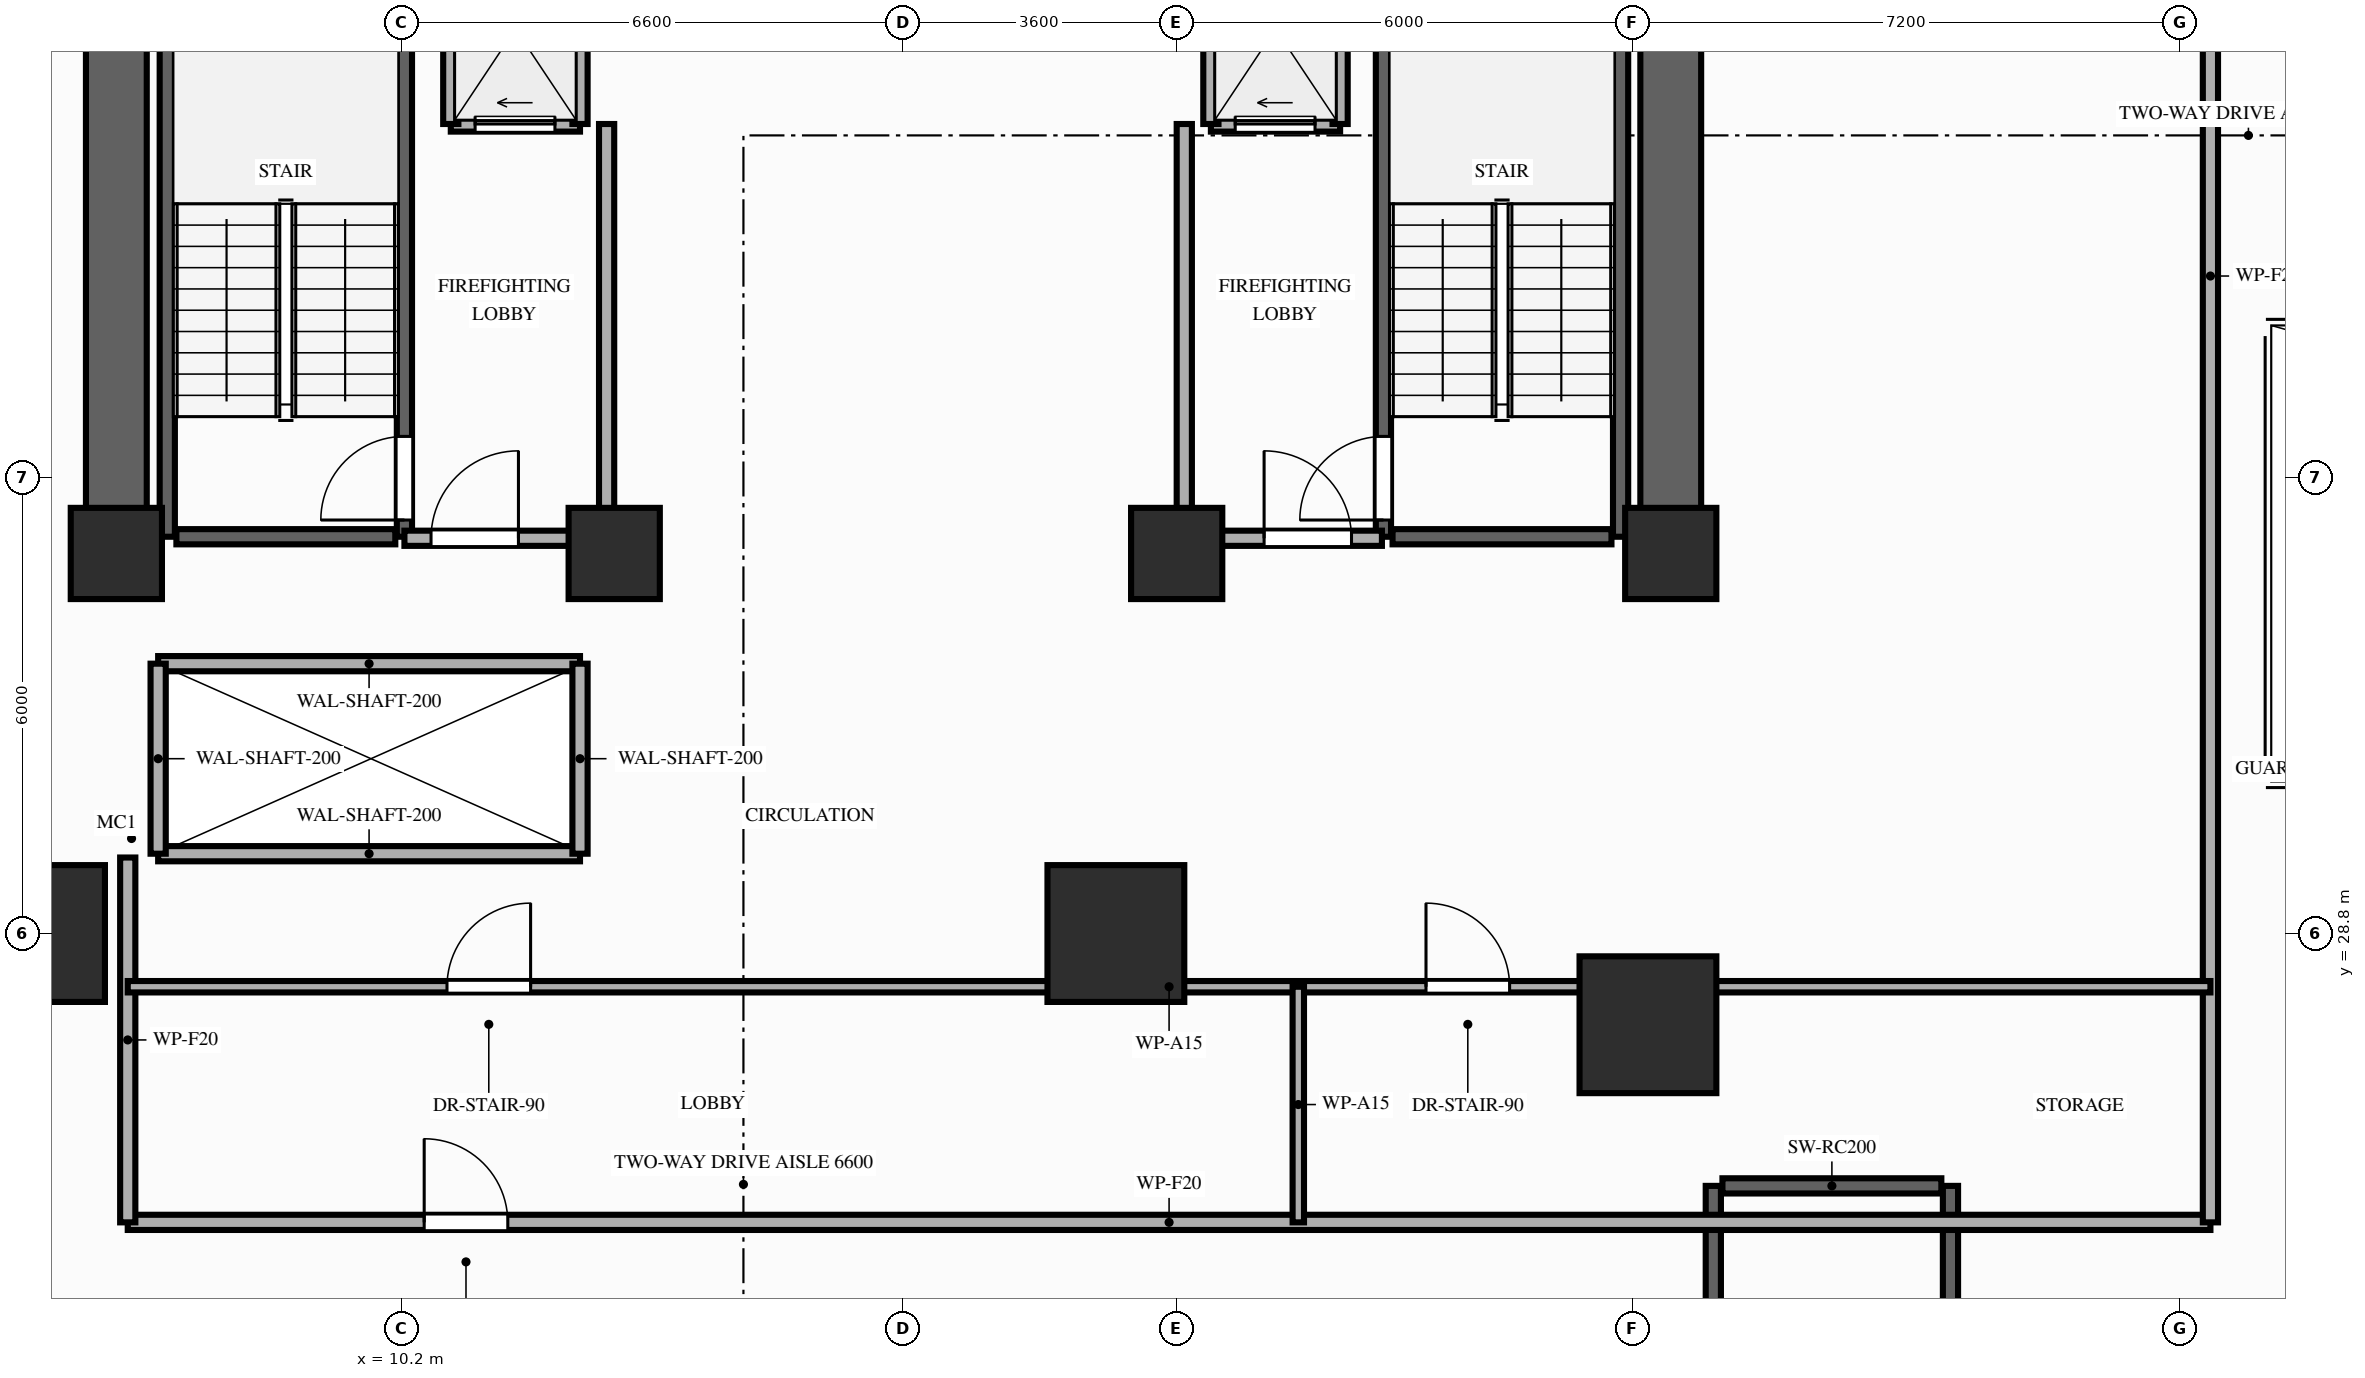
"""IFC4 building model, lengths in metres.
Left out: names, types, materials, properties, quantities, classifications, styles, units other than length and angle.
Written with IfcOpenShell. Run it as: python <this file> out.ifc"""

import sys

from ifc_helpers import new_model, si_unit, direction, frame, frame_2d, origin, origin_2d, place, context, subcontext, project, spatial, rectangle, extrude, element, fill, save


model = new_model("IFC4")
c1 = context("Model", 3, precision=1e-05, world=origin(), true_north=direction((0.0, 1.0)))
c2 = subcontext(c1, "Body", "Model", "MODEL_VIEW")
j1 = project(units=[si_unit("LENGTHUNIT", "METRE"), si_unit("PLANEANGLEUNIT", "RADIAN")], contexts=[c1])
p1 = place(None, origin())
s1 = spatial("IfcSite", under=j1, at=p1, CompositionType="ELEMENT")
p2 = place(p1, origin())
s2 = spatial("IfcBuilding", under=s1, at=p2, CompositionType="ELEMENT")
p3 = place(p2, frame((0.0, 0.0, -3.8)))
s3 = spatial("IfcBuildingStorey", under=s2, at=p3, CompositionType="ELEMENT", Elevation=-3.8)
for number, where, z_axis, x_axis in (
    (1, (6.45, 33.8, 0.0), (0.0, 0.0, 1.0), (1.0, 0.0, 0.0)),
    (2, (13.0, 33.8, 0.0), (0.0, 0.0, 1.0), (1.0, 0.0, 0.0)),
    (3, (20.4, 33.8, 0.0), (0.0, 0.0, 1.0), (1.0, 0.0, 0.0)),
    (4, (26.9, 33.8, 0.0), (0.0, 0.0, 1.0), (1.0, 0.0, 0.0)),
):
    element("IfcColumn", number, at=place(p3, frame(where, z_axis=z_axis, x_axis=x_axis)), inside=s3, PredefinedType="COLUMN", context=c2, shape_type="SweptSolid", body=[
        extrude(rectangle(XDim=1.2, YDim=1.2, at=origin_2d()), origin(), (0.0, 0.0, 1.0), 3.8),
    ])
for number, where, z_axis, x_axis in (
    (5, (5.4, 28.8, 0.0), (0.0, 0.0, 1.0), (1.0, 0.0, 0.0)),
    (6, (19.6, 28.8, 0.0), (0.0, 0.0, 1.0), (1.0, 0.0, 0.0)),
    (7, (26.6, 27.6, 0.0), (0.0, 0.0, 1.0), (1.0, 0.0, 0.0)),
):
    element("IfcColumn", number, at=place(p3, frame(where, z_axis=z_axis, x_axis=x_axis)), inside=s3, PredefinedType="COLUMN", context=c2, shape_type="SweptSolid", body=[
        extrude(rectangle(XDim=1.8, YDim=1.8, at=origin_2d()), origin(), (0.0, 0.0, 1.0), 3.8),
    ])
for number, where, z_axis, x_axis in (
    (8, (6.45, 33.8, 0.0), (0.0, 0.0, 1.0), (0.0, 1.0, 0.0)),
    (9, (26.9, 33.8, 0.0), (0.0, 0.0, 1.0), (0.0, 1.0, 0.0)),
):
    element("IfcWall", number, at=place(p3, frame(where, z_axis=z_axis, x_axis=x_axis)), inside=s3, PredefinedType="SHEAR", context=c2, shape_type="SweptSolid", body=[
        extrude(rectangle(XDim=7.95, YDim=0.8, at=frame_2d((3.975, 0.0))), origin(), (0.0, 0.0, 1.0), 3.55),
    ])
p4 = place(p3, frame((7.12, 34.02, 0.0), z_axis=(0.0, 0.0, 1.0), x_axis=(0.0, 1.0, 0.0)))
e10 = element("IfcWall", 10, at=p4, inside=s3, PredefinedType="SHEAR", context=c2, shape_type="SweptSolid", body=[
    extrude(rectangle(XDim=7.78, YDim=0.2, at=frame_2d((3.89, 0.0))), origin(), (0.0, 0.0, 1.0), 3.55),
])
p5 = place(p3, frame((10.24, 34.02, 0.0), z_axis=(0.0, 0.0, 1.0), x_axis=(0.0, 1.0, 0.0)))
e11 = element("IfcWall", 11, at=p5, inside=s3, PredefinedType="SHEAR", context=c2, shape_type="SweptSolid", body=[
    extrude(rectangle(XDim=7.78, YDim=0.2, at=frame_2d((3.89, 0.0))), origin(), (0.0, 0.0, 1.0), 3.55),
])
p6 = place(p5, frame((0.22, 0.0, 0.0)))
e12 = element("IfcOpeningElement", 12, at=p6, cuts=e11, PredefinedType="OPENING", context=c2, shape_type="SweptSolid", body=[
    extrude(rectangle(XDim=1.1, YDim=2.15, at=frame_2d((0.55, 1.075))), frame((0.0, 0.11, 0.0), z_axis=(0.0, -1.0, 0.0), x_axis=(1.0, 0.0, 0.0)), (0.0, 0.0, 1.0), 0.22),
])
p7 = place(p3, frame((7.24, 34.02, 0.0), z_axis=(0.0, 0.0, 1.0), x_axis=(1.0, 0.0, 0.0)))
e13 = element("IfcWall", 13, at=p7, inside=s3, PredefinedType="SHEAR", context=c2, shape_type="SweptSolid", body=[
    extrude(rectangle(XDim=2.88, YDim=0.2, at=frame_2d((1.44, 0.0))), origin(), (0.0, 0.0, 1.0), 3.55),
])
p8 = place(p3, frame((23.12, 34.02, 0.0), z_axis=(0.0, 0.0, 1.0), x_axis=(0.0, 1.0, 0.0)))
e14 = element("IfcWall", 14, at=p8, inside=s3, PredefinedType="SHEAR", context=c2, shape_type="SweptSolid", body=[
    extrude(rectangle(XDim=7.78, YDim=0.2, at=frame_2d((3.89, 0.0))), origin(), (0.0, 0.0, 1.0), 3.55),
])
p9 = place(p8, frame((0.22, 0.0, 0.0)))
e15 = element("IfcOpeningElement", 15, at=p9, cuts=e14, PredefinedType="OPENING", context=c2, shape_type="SweptSolid", body=[
    extrude(rectangle(XDim=1.1, YDim=2.15, at=frame_2d((0.55, 1.075))), frame((0.0, 0.11, 0.0), z_axis=(0.0, -1.0, 0.0), x_axis=(1.0, 0.0, 0.0)), (0.0, 0.0, 1.0), 0.22),
])
p10 = place(p3, frame((26.24, 34.02, 0.0), z_axis=(0.0, 0.0, 1.0), x_axis=(0.0, 1.0, 0.0)))
e16 = element("IfcWall", 16, at=p10, inside=s3, PredefinedType="SHEAR", context=c2, shape_type="SweptSolid", body=[
    extrude(rectangle(XDim=7.78, YDim=0.2, at=frame_2d((3.89, 0.0))), origin(), (0.0, 0.0, 1.0), 3.55),
])
p11 = place(p3, frame((23.24, 34.02, 0.0), z_axis=(0.0, 0.0, 1.0), x_axis=(1.0, 0.0, 0.0)))
e17 = element("IfcWall", 17, at=p11, inside=s3, PredefinedType="SHEAR", context=c2, shape_type="SweptSolid", body=[
    extrude(rectangle(XDim=2.88, YDim=0.2, at=frame_2d((1.44, 0.0))), origin(), (0.0, 0.0, 1.0), 3.55),
])
for number, where, z_axis, x_axis in (
    (18, (27.46, 17.52, 0.0), (0.0, 0.0, 1.0), (0.0, 1.0, 0.0)),
    (19, (30.58, 17.52, 0.0), (0.0, 0.0, 1.0), (0.0, 1.0, 0.0)),
):
    element("IfcWall", number, at=place(p3, frame(where, z_axis=z_axis, x_axis=x_axis)), inside=s3, PredefinedType="SHEAR", context=c2, shape_type="SweptSolid", body=[
        extrude(rectangle(XDim=7.96, YDim=0.2, at=frame_2d((3.98, 0.0))), origin(), (0.0, 0.0, 1.0), 3.55),
    ])
p12 = place(p3, frame((27.58, 25.48, 0.0), z_axis=(0.0, 0.0, 1.0), x_axis=(1.0, 0.0, 0.0)))
e20 = element("IfcWall", 20, at=p12, inside=s3, PredefinedType="SHEAR", context=c2, shape_type="SweptSolid", body=[
    extrude(rectangle(XDim=2.88, YDim=0.2, at=frame_2d((1.44, 0.0))), origin(), (0.0, 0.0, 1.0), 3.55),
])
for number, where, z_axis, x_axis in (
    (21, (7.0, 29.85, 0.0), (0.0, 0.0, 1.0), (1.0, 0.0, 0.0)),
    (22, (7.0, 32.35, 0.0), (0.0, 0.0, 1.0), (1.0, 0.0, 0.0)),
):
    element("IfcWall", number, at=place(p3, frame(where, z_axis=z_axis, x_axis=x_axis)), inside=s3, PredefinedType="MOVABLE", context=c2, shape_type="SweptSolid", body=[
        extrude(rectangle(XDim=5.55, YDim=0.2, at=frame_2d((2.775, 0.0))), origin(), (0.0, 0.0, 1.0), 3.55),
    ])
for number, where, z_axis, x_axis in (
    (23, (7.0, 29.85, 0.0), (0.0, 0.0, 1.0), (0.0, 1.0, 0.0)),
    (24, (12.55, 29.85, 0.0), (0.0, 0.0, 1.0), (0.0, 1.0, 0.0)),
):
    element("IfcWall", number, at=place(p3, frame(where, z_axis=z_axis, x_axis=x_axis)), inside=s3, PredefinedType="MOVABLE", context=c2, shape_type="SweptSolid", body=[
        extrude(rectangle(XDim=2.5, YDim=0.2, at=frame_2d((1.25, 0.0))), origin(), (0.0, 0.0, 1.0), 3.55),
    ])
p13 = place(p3, frame((10.85, 39.45, 0.0), z_axis=(0.0, 0.0, 1.0), x_axis=(1.0, 0.0, 0.0)))
e25 = element("IfcWall", 25, at=p13, inside=s3, PredefinedType="MOVABLE", context=c2, shape_type="SweptSolid", body=[
    extrude(rectangle(XDim=1.7, YDim=0.2, at=frame_2d((0.85, 0.0))), origin(), (0.0, 0.0, 1.0), 3.55),
])
p14 = place(p13, frame((0.32, 0.0, 0.0)))
e26 = element("IfcOpeningElement", 26, at=p14, cuts=e25, PredefinedType="OPENING", context=c2, shape_type="SweptSolid", body=[
    extrude(rectangle(XDim=1.05, YDim=2.15, at=frame_2d((0.525, 1.075))), frame((0.0, 0.11, 0.0), z_axis=(0.0, -1.0, 0.0), x_axis=(1.0, 0.0, 0.0)), (0.0, 0.0, 1.0), 0.22),
])
p15 = place(p3, frame((20.85, 39.45, 0.0), z_axis=(0.0, 0.0, 1.0), x_axis=(1.0, 0.0, 0.0)))
e27 = element("IfcWall", 27, at=p15, inside=s3, PredefinedType="MOVABLE", context=c2, shape_type="SweptSolid", body=[
    extrude(rectangle(XDim=1.7, YDim=0.2, at=frame_2d((0.85, 0.0))), origin(), (0.0, 0.0, 1.0), 3.55),
])
p16 = place(p15, frame((0.32, 0.0, 0.0)))
e28 = element("IfcOpeningElement", 28, at=p16, cuts=e27, PredefinedType="OPENING", context=c2, shape_type="SweptSolid", body=[
    extrude(rectangle(XDim=1.05, YDim=2.15, at=frame_2d((0.525, 1.075))), frame((0.0, 0.11, 0.0), z_axis=(0.0, -1.0, 0.0), x_axis=(1.0, 0.0, 0.0)), (0.0, 0.0, 1.0), 0.22),
])
for number, where, z_axis, x_axis in (
    (29, (10.85, 39.45, 0.0), (0.0, 0.0, 1.0), (0.0, 1.0, 0.0)),
    (30, (12.55, 39.45, 0.0), (0.0, 0.0, 1.0), (0.0, 1.0, 0.0)),
):
    element("IfcWall", number, at=place(p3, frame(where, z_axis=z_axis, x_axis=x_axis)), inside=s3, PredefinedType="MOVABLE", context=c2, shape_type="SweptSolid", body=[
        extrude(rectangle(XDim=2.65, YDim=0.2, at=frame_2d((1.325, 0.0))), origin(), (0.0, 0.0, 1.0), 3.55),
    ])
p17 = place(p3, frame((12.9, 34.0, 0.0), z_axis=(0.0, 0.0, 1.0), x_axis=(0.0, 1.0, 0.0)))
e31 = element("IfcWall", 31, at=p17, inside=s3, PredefinedType="PARTITIONING", context=c2, shape_type="SweptSolid", body=[
    extrude(rectangle(XDim=5.45, YDim=0.2, at=frame_2d((2.725, 0.0))), origin(), (0.0, 0.0, 1.0), 2.74),
])
p18 = place(p3, frame((10.24, 34.0, 0.0), z_axis=(0.0, 0.0, 1.0), x_axis=(1.0, 0.0, 0.0)))
e32 = element("IfcWall", 32, at=p18, inside=s3, PredefinedType="PARTITIONING", context=c2, shape_type="SweptSolid", body=[
    extrude(rectangle(XDim=2.66, YDim=0.2, at=frame_2d((1.33, 0.0))), origin(), (0.0, 0.0, 1.0), 2.74),
])
p19 = place(p18, frame((0.35, 0.0, 0.0)))
e33 = element("IfcOpeningElement", 33, at=p19, cuts=e32, PredefinedType="OPENING", context=c2, shape_type="SweptSolid", body=[
    extrude(rectangle(XDim=1.15, YDim=2.15, at=frame_2d((0.575, 1.075))), frame((0.0, 0.11, 0.0), z_axis=(0.0, -1.0, 0.0), x_axis=(1.0, 0.0, 0.0)), (0.0, 0.0, 1.0), 0.22),
])
for number, where, z_axis, x_axis in (
    (34, (20.85, 39.45, 0.0), (0.0, 0.0, 1.0), (0.0, 1.0, 0.0)),
    (35, (22.55, 39.45, 0.0), (0.0, 0.0, 1.0), (0.0, 1.0, 0.0)),
):
    element("IfcWall", number, at=place(p3, frame(where, z_axis=z_axis, x_axis=x_axis)), inside=s3, PredefinedType="MOVABLE", context=c2, shape_type="SweptSolid", body=[
        extrude(rectangle(XDim=2.65, YDim=0.2, at=frame_2d((1.325, 0.0))), origin(), (0.0, 0.0, 1.0), 3.55),
    ])
p20 = place(p3, frame((20.5, 34.0, 0.0), z_axis=(0.0, 0.0, 1.0), x_axis=(0.0, 1.0, 0.0)))
e36 = element("IfcWall", 36, at=p20, inside=s3, PredefinedType="PARTITIONING", context=c2, shape_type="SweptSolid", body=[
    extrude(rectangle(XDim=5.45, YDim=0.2, at=frame_2d((2.725, 0.0))), origin(), (0.0, 0.0, 1.0), 2.74),
])
p21 = place(p3, frame((20.5, 34.0, 0.0), z_axis=(0.0, 0.0, 1.0), x_axis=(1.0, 0.0, 0.0)))
e37 = element("IfcWall", 37, at=p21, inside=s3, PredefinedType="PARTITIONING", context=c2, shape_type="SweptSolid", body=[
    extrude(rectangle(XDim=2.6, YDim=0.2, at=frame_2d((1.3, 0.0))), origin(), (0.0, 0.0, 1.0), 2.74),
])
p22 = place(p21, frame((1.05, 0.0, 0.0)))
e38 = element("IfcOpeningElement", 38, at=p22, cuts=e37, PredefinedType="OPENING", context=c2, shape_type="SweptSolid", body=[
    extrude(rectangle(XDim=1.15, YDim=2.15, at=frame_2d((0.575, 1.075))), frame((0.0, 0.11, 0.0), z_axis=(0.0, -1.0, 0.0), x_axis=(1.0, 0.0, 0.0)), (0.0, 0.0, 1.0), 0.22),
])
p23 = place(p3, frame((6.6, 25.0, 0.0), z_axis=(0.0, 0.0, 1.0), x_axis=(1.0, 0.0, 0.0)))
e39 = element("IfcWall", 39, at=p23, inside=s3, PredefinedType="PARTITIONING", context=c2, shape_type="SweptSolid", body=[
    extrude(rectangle(XDim=27.4, YDim=0.2, at=frame_2d((13.7, 0.0))), origin(), (0.0, 0.0, 1.0), 2.74),
])
p24 = place(p23, frame((3.9, 0.0, 0.0)))
e40 = element("IfcOpeningElement", 40, at=p24, cuts=e39, PredefinedType="OPENING", context=c2, shape_type="SweptSolid", body=[
    extrude(rectangle(XDim=1.1, YDim=2.15, at=frame_2d((0.55, 1.075))), frame((0.0, 0.11, 0.0), z_axis=(0.0, -1.0, 0.0), x_axis=(1.0, 0.0, 0.0)), (0.0, 0.0, 1.0), 0.22),
])
p25 = place(p3, frame((6.6, 25.0, 0.0), z_axis=(0.0, 0.0, 1.0), x_axis=(0.0, 1.0, 0.0)))
e41 = element("IfcWall", 41, at=p25, inside=s3, PredefinedType="PARTITIONING", context=c2, shape_type="SweptSolid", body=[
    extrude(rectangle(XDim=4.8, YDim=0.2, at=frame_2d((2.4, 0.0))), origin(), (0.0, 0.0, 1.0), 2.74),
])
p26 = place(p3, frame((34.0, 25.0, 0.0), z_axis=(0.0, 0.0, 1.0), x_axis=(0.0, 1.0, 0.0)))
e42 = element("IfcWall", 42, at=p26, inside=s3, PredefinedType="PARTITIONING", context=c2, shape_type="SweptSolid", body=[
    extrude(rectangle(XDim=24.9, YDim=0.2, at=frame_2d((12.45, 0.0))), origin(), (0.0, 0.0, 1.0), 2.74),
])
p27 = place(p3, frame((6.6, 28.1, 0.0), z_axis=(0.0, 0.0, 1.0), x_axis=(1.0, 0.0, 0.0)))
e43 = element("IfcWall", 43, at=p27, inside=s3, PredefinedType="PARTITIONING", context=c2, shape_type="SweptSolid", body=[
    extrude(rectangle(XDim=27.4, YDim=0.15, at=frame_2d((13.7, 0.0))), origin(), (0.0, 0.0, 1.0), 2.74),
])
p28 = place(p27, frame((4.2, 0.0, 0.0)))
e44 = element("IfcOpeningElement", 44, at=p28, cuts=e43, PredefinedType="OPENING", context=c2, shape_type="SweptSolid", body=[
    extrude(rectangle(XDim=1.1, YDim=2.15, at=frame_2d((0.55, 1.075))), frame((0.0, 0.085, 0.0), z_axis=(0.0, -1.0, 0.0), x_axis=(1.0, 0.0, 0.0)), (0.0, 0.0, 1.0), 0.17),
])
p29 = place(p27, frame((17.08, 0.0, 0.0)))
e45 = element("IfcOpeningElement", 45, at=p29, cuts=e43, PredefinedType="OPENING", context=c2, shape_type="SweptSolid", body=[
    extrude(rectangle(XDim=1.1, YDim=2.15, at=frame_2d((0.55, 1.075))), frame((0.0, 0.085, 0.0), z_axis=(0.0, -1.0, 0.0), x_axis=(1.0, 0.0, 0.0)), (0.0, 0.0, 1.0), 0.17),
])
p30 = place(p3, frame((22.0, 25.0, 0.0), z_axis=(0.0, 0.0, 1.0), x_axis=(0.0, 1.0, 0.0)))
e46 = element("IfcWall", 46, at=p30, inside=s3, PredefinedType="PARTITIONING", context=c2, shape_type="SweptSolid", body=[
    extrude(rectangle(XDim=3.1, YDim=0.15, at=frame_2d((1.55, 0.0))), origin(), (0.0, 0.0, 1.0), 3.55),
])
p31 = place(p6, origin())
e47 = element("IfcDoor", 47, at=p31, inside=s3, OperationType="SINGLE_SWING_LEFT", PredefinedType="DOOR", context=c2, shape_type="SweptSolid", body=[
    extrude(rectangle(XDim=1.1, YDim=2.15, at=frame_2d((0.55, 1.075))), frame((0.0, 0.025, 0.0), z_axis=(0.0, -1.0, 0.0), x_axis=(1.0, 0.0, 0.0)), (0.0, 0.0, 1.0), 0.05),
])
fill(e12, e47)
p32 = place(p9, origin())
e48 = element("IfcDoor", 48, at=p32, inside=s3, OperationType="SINGLE_SWING_LEFT", PredefinedType="DOOR", context=c2, shape_type="SweptSolid", body=[
    extrude(rectangle(XDim=1.1, YDim=2.15, at=frame_2d((0.55, 1.075))), frame((0.0, 0.025, 0.0), z_axis=(0.0, -1.0, 0.0), x_axis=(1.0, 0.0, 0.0)), (0.0, 0.0, 1.0), 0.05),
])
fill(e15, e48)
p33 = place(p14, origin())
e49 = element("IfcDoor", 49, at=p33, inside=s3, OperationType="SLIDING_TO_LEFT", PredefinedType="DOOR", context=c2, shape_type="SweptSolid", body=[
    extrude(rectangle(XDim=1.05, YDim=2.15, at=frame_2d((0.525, 1.075))), frame((0.0, 0.025, 0.0), z_axis=(0.0, -1.0, 0.0), x_axis=(1.0, 0.0, 0.0)), (0.0, 0.0, 1.0), 0.05),
])
fill(e26, e49)
p34 = place(p16, origin())
e50 = element("IfcDoor", 50, at=p34, inside=s3, OperationType="SLIDING_TO_LEFT", PredefinedType="DOOR", context=c2, shape_type="SweptSolid", body=[
    extrude(rectangle(XDim=1.05, YDim=2.15, at=frame_2d((0.525, 1.075))), frame((0.0, 0.025, 0.0), z_axis=(0.0, -1.0, 0.0), x_axis=(1.0, 0.0, 0.0)), (0.0, 0.0, 1.0), 0.05),
])
fill(e28, e50)
p35 = place(p19, origin())
e51 = element("IfcDoor", 51, at=p35, inside=s3, OperationType="SINGLE_SWING_RIGHT", PredefinedType="DOOR", context=c2, shape_type="SweptSolid", body=[
    extrude(rectangle(XDim=1.15, YDim=2.15, at=frame_2d((0.575, 1.075))), frame((0.0, 0.025, 0.0), z_axis=(0.0, -1.0, 0.0), x_axis=(1.0, 0.0, 0.0)), (0.0, 0.0, 1.0), 0.05),
])
fill(e33, e51)
p36 = place(p22, origin())
e52 = element("IfcDoor", 52, at=p36, inside=s3, OperationType="SINGLE_SWING_LEFT", PredefinedType="DOOR", context=c2, shape_type="SweptSolid", body=[
    extrude(rectangle(XDim=1.15, YDim=2.15, at=frame_2d((0.575, 1.075))), frame((0.0, 0.025, 0.0), z_axis=(0.0, -1.0, 0.0), x_axis=(1.0, 0.0, 0.0)), (0.0, 0.0, 1.0), 0.05),
])
fill(e38, e52)
p37 = place(p24, origin())
e53 = element("IfcDoor", 53, at=p37, inside=s3, OperationType="SINGLE_SWING_LEFT", PredefinedType="DOOR", context=c2, shape_type="SweptSolid", body=[
    extrude(rectangle(XDim=1.1, YDim=2.15, at=frame_2d((0.55, 1.075))), frame((0.0, 0.025, 0.0), z_axis=(0.0, -1.0, 0.0), x_axis=(1.0, 0.0, 0.0)), (0.0, 0.0, 1.0), 0.05),
])
fill(e40, e53)
p38 = place(p28, origin())
e54 = element("IfcDoor", 54, at=p38, inside=s3, OperationType="SINGLE_SWING_RIGHT", PredefinedType="DOOR", context=c2, shape_type="SweptSolid", body=[
    extrude(rectangle(XDim=1.1, YDim=2.15, at=frame_2d((0.55, 1.075))), frame((0.0, 0.025, 0.0), z_axis=(0.0, -1.0, 0.0), x_axis=(1.0, 0.0, 0.0)), (0.0, 0.0, 1.0), 0.05),
])
fill(e44, e54)
p39 = place(p29, origin())
e55 = element("IfcDoor", 55, at=p39, inside=s3, OperationType="SINGLE_SWING_LEFT", PredefinedType="DOOR", context=c2, shape_type="SweptSolid", body=[
    extrude(rectangle(XDim=1.1, YDim=2.15, at=frame_2d((0.55, 1.075))), frame((0.0, 0.025, 0.0), z_axis=(0.0, -1.0, 0.0), x_axis=(1.0, 0.0, 0.0)), (0.0, 0.0, 1.0), 0.05),
])
fill(e45, e55)
save(model, sys.argv[1])
